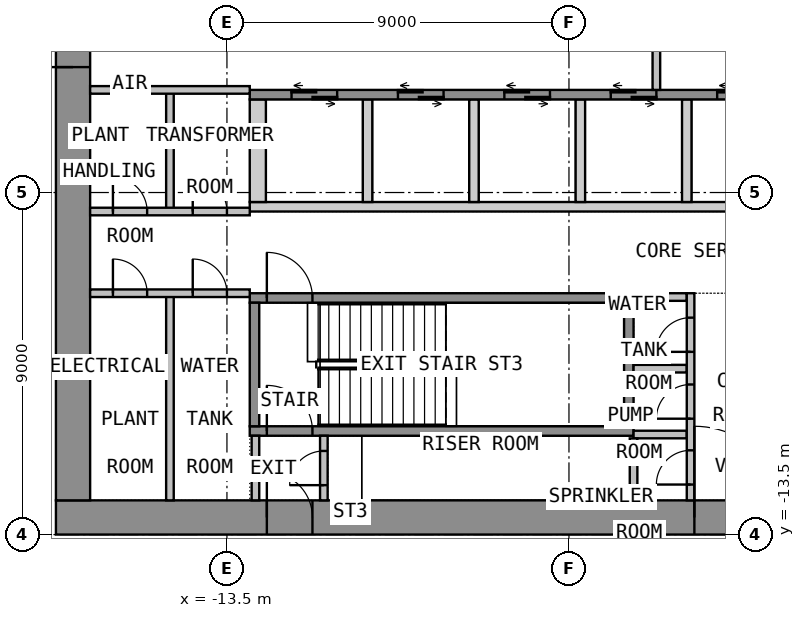
"""IFC4 building model, lengths in metres.
Left out: names, types, materials, properties, quantities, classifications, styles, units other than length and angle.
Written with IfcOpenShell. Run it as: python <this file> out.ifc"""

import sys

from ifc_helpers import new_model, si_unit, direction, frame, frame_2d, origin, place, context, subcontext, project, spatial, polyline, rectangle, outline, extrude, element, fill, save


model = new_model("IFC4")
c1 = context("Model", 3, precision=1e-05, world=origin(), true_north=direction((0.0, 1.0)))
c2 = subcontext(c1, "Body", "Model", "MODEL_VIEW")
j1 = project(units=[si_unit("LENGTHUNIT", "METRE"), si_unit("PLANEANGLEUNIT", "RADIAN")], contexts=[c1])
p1 = place(None, origin())
s1 = spatial("IfcSite", under=j1, at=p1, CompositionType="ELEMENT")
p2 = place(p1, origin())
s2 = spatial("IfcBuilding", under=s1, at=p2, CompositionType="ELEMENT")
p3 = place(p2, frame((0.0, 0.0, 76.8)))
s3 = spatial("IfcBuildingStorey", under=s2, at=p3, CompositionType="ELEMENT", Elevation=76.8)
p4 = place(p3, frame((-18.0, -13.05, 0.0), z_axis=(0.0, 0.0, 1.0), x_axis=(1.0, 0.0, 0.0)))
e1 = element("IfcWall", 1, at=p4, inside=s3, PredefinedType="SHEAR", context=c2, shape_type="SweptSolid", body=[
    extrude(rectangle(XDim=36.0, YDim=0.9, at=frame_2d((18.0, 0.0))), origin(), (0.0, 0.0, 1.0), 4.125),
])
p5 = place(p4, frame((16.8, 0.0, 0.0)))
e2 = element("IfcOpeningElement", 2, at=p5, cuts=e1, PredefinedType="OPENING", context=c2, shape_type="SweptSolid", body=[
    extrude(rectangle(XDim=2.4, YDim=2.1, at=frame_2d((1.2, 1.05))), frame((0.0, 0.46, 0.0), z_axis=(0.0, -1.0, 0.0), x_axis=(1.0, 0.0, 0.0)), (0.0, 0.0, 1.0), 0.92),
])
p6 = place(p4, frame((5.55, 0.0, 0.0)))
e3 = element("IfcOpeningElement", 3, at=p6, cuts=e1, PredefinedType="OPENING", context=c2, shape_type="SweptSolid", body=[
    extrude(rectangle(XDim=1.2, YDim=2.1, at=frame_2d((0.6, 1.05))), frame((0.0, 0.46, 0.0), z_axis=(0.0, -1.0, 0.0), x_axis=(1.0, 0.0, 0.0)), (0.0, 0.0, 1.0), 0.92),
])
p7 = place(p4, frame((29.25, 0.0, 0.0)))
e4 = element("IfcOpeningElement", 4, at=p7, cuts=e1, PredefinedType="OPENING", context=c2, shape_type="SweptSolid", body=[
    extrude(rectangle(XDim=1.2, YDim=2.1, at=frame_2d((0.6, 1.05))), frame((0.0, 0.46, 0.0), z_axis=(0.0, -1.0, 0.0), x_axis=(1.0, 0.0, 0.0)), (0.0, 0.0, 1.0), 0.92),
])
p8 = place(p3, frame((-17.55, -12.6, 0.0), z_axis=(0.0, 0.0, 1.0), x_axis=(0.0, 1.0, 0.0)))
e5 = element("IfcWall", 5, at=p8, inside=s3, PredefinedType="SHEAR", context=c2, shape_type="SweptSolid", body=[
    extrude(rectangle(XDim=25.2, YDim=0.9, at=frame_2d((12.6, 0.0))), origin(), (0.0, 0.0, 1.0), 4.125),
])
p9 = place(p8, frame((11.4, 0.0, 0.0)))
e6 = element("IfcOpeningElement", 6, at=p9, cuts=e5, PredefinedType="OPENING", context=c2, shape_type="SweptSolid", body=[
    extrude(rectangle(XDim=2.4, YDim=2.1, at=frame_2d((1.2, 1.05))), frame((0.0, 0.46, 0.0), z_axis=(0.0, -1.0, 0.0), x_axis=(1.0, 0.0, 0.0)), (0.0, 0.0, 1.0), 0.92),
])
p10 = place(p3, origin())
e7 = element("IfcWall", 7, at=p10, inside=s3, PredefinedType="SHEAR", context=c2, shape_type="SweptSolid", body=[
    extrude(outline(polyline([(-12.9, -5.0), (12.9, -5.0), (12.9, -4.75), (-12.9, -4.75), (-12.9, -5.0)])), origin(), (0.0, 0.0, 1.0), 4.125),
])
p11 = place(p3, origin())
e8 = element("IfcWall", 8, at=p11, inside=s3, PredefinedType="SHEAR", context=c2, shape_type="SweptSolid", body=[
    extrude(outline(polyline([(-12.9, -4.75), (-12.475, -4.75), (-12.475, -2.05), (-12.9, -2.05), (-12.9, -4.75)])), origin(), (0.0, 0.0, 1.0), 4.125),
])
p12 = place(p3, origin())
e9 = element("IfcWall", 9, at=p12, inside=s3, PredefinedType="SHEAR", context=c2, shape_type="SweptSolid", body=[
    extrude(outline(polyline([(-9.925, -4.75), (-9.675, -4.75), (-9.675, -2.05), (-9.925, -2.05), (-9.925, -4.75)])), origin(), (0.0, 0.0, 1.0), 4.125),
])
p13 = place(p3, origin())
e10 = element("IfcWall", 10, at=p13, inside=s3, PredefinedType="SHEAR", context=c2, shape_type="SweptSolid", body=[
    extrude(outline(polyline([(-7.125, -4.75), (-6.875, -4.75), (-6.875, -2.05), (-7.125, -2.05), (-7.125, -4.75)])), origin(), (0.0, 0.0, 1.0), 4.125),
])
p14 = place(p3, origin())
e11 = element("IfcWall", 11, at=p14, inside=s3, PredefinedType="SHEAR", context=c2, shape_type="SweptSolid", body=[
    extrude(outline(polyline([(-4.325, -4.75), (-4.075, -4.75), (-4.075, -2.05), (-4.325, -2.05), (-4.325, -4.75)])), origin(), (0.0, 0.0, 1.0), 4.125),
])
p15 = place(p3, origin())
e12 = element("IfcWall", 12, at=p15, inside=s3, PredefinedType="SHEAR", context=c2, shape_type="SweptSolid", body=[
    extrude(outline(polyline([(-1.525, -4.75), (-1.275, -4.75), (-1.275, -2.05), (-1.525, -2.05), (-1.525, -4.75)])), origin(), (0.0, 0.0, 1.0), 4.125),
])
p16 = place(p3, frame((-12.9, -1.925, 0.0), z_axis=(0.0, 0.0, 1.0), x_axis=(1.0, 0.0, 0.0)))
e13 = element("IfcWall", 13, at=p16, inside=s3, PredefinedType="SHEAR", context=c2, shape_type="SweptSolid", body=[
    extrude(rectangle(XDim=25.8, YDim=0.25, at=frame_2d((12.9, 0.0))), origin(), (0.0, 0.0, 1.0), 4.125),
])
p17 = place(p16, frame((1.1, 0.0, 0.0)))
e14 = element("IfcOpeningElement", 14, at=p17, cuts=e13, PredefinedType="OPENING", context=c2, shape_type="SweptSolid", body=[
    extrude(rectangle(XDim=1.2, YDim=2.1, at=frame_2d((0.6, 1.05))), frame((0.0, 0.135, 0.0), z_axis=(0.0, -1.0, 0.0), x_axis=(1.0, 0.0, 0.0)), (0.0, 0.0, 1.0), 0.27),
])
p18 = place(p16, frame((3.9, 0.0, 0.0)))
e15 = element("IfcOpeningElement", 15, at=p18, cuts=e13, PredefinedType="OPENING", context=c2, shape_type="SweptSolid", body=[
    extrude(rectangle(XDim=1.2, YDim=2.1, at=frame_2d((0.6, 1.05))), frame((0.0, 0.135, 0.0), z_axis=(0.0, -1.0, 0.0), x_axis=(1.0, 0.0, 0.0)), (0.0, 0.0, 1.0), 0.27),
])
p19 = place(p16, frame((6.7, 0.0, 0.0)))
e16 = element("IfcOpeningElement", 16, at=p19, cuts=e13, PredefinedType="OPENING", context=c2, shape_type="SweptSolid", body=[
    extrude(rectangle(XDim=1.2, YDim=2.1, at=frame_2d((0.6, 1.05))), frame((0.0, 0.135, 0.0), z_axis=(0.0, -1.0, 0.0), x_axis=(1.0, 0.0, 0.0)), (0.0, 0.0, 1.0), 0.27),
])
p20 = place(p16, frame((9.5, 0.0, 0.0)))
e17 = element("IfcOpeningElement", 17, at=p20, cuts=e13, PredefinedType="OPENING", context=c2, shape_type="SweptSolid", body=[
    extrude(rectangle(XDim=1.2, YDim=2.1, at=frame_2d((0.6, 1.05))), frame((0.0, 0.135, 0.0), z_axis=(0.0, -1.0, 0.0), x_axis=(1.0, 0.0, 0.0)), (0.0, 0.0, 1.0), 0.27),
])
p21 = place(p16, frame((12.3, 0.0, 0.0)))
e18 = element("IfcOpeningElement", 18, at=p21, cuts=e13, PredefinedType="OPENING", context=c2, shape_type="SweptSolid", body=[
    extrude(rectangle(XDim=1.2, YDim=2.1, at=frame_2d((0.6, 1.05))), frame((0.0, 0.135, 0.0), z_axis=(0.0, -1.0, 0.0), x_axis=(1.0, 0.0, 0.0)), (0.0, 0.0, 1.0), 0.27),
])
p22 = place(p16, frame((15.1, 0.0, 0.0)))
e19 = element("IfcOpeningElement", 19, at=p22, cuts=e13, PredefinedType="OPENING", context=c2, shape_type="SweptSolid", body=[
    extrude(rectangle(XDim=1.2, YDim=2.1, at=frame_2d((0.6, 1.05))), frame((0.0, 0.135, 0.0), z_axis=(0.0, -1.0, 0.0), x_axis=(1.0, 0.0, 0.0)), (0.0, 0.0, 1.0), 0.27),
])
p23 = place(p3, frame((-2.2, -1.8, 0.0), z_axis=(0.0, 0.0, 1.0), x_axis=(0.0, 1.0, 0.0)))
e20 = element("IfcWall", 20, at=p23, inside=s3, PredefinedType="PARTITIONING", context=c2, shape_type="SweptSolid", body=[
    extrude(rectangle(XDim=3.6, YDim=0.2, at=frame_2d((1.8, 0.0))), origin(), (0.0, 0.0, 1.0), 4.125),
])
p24 = place(p23, frame((1.2, 0.0, 0.0)))
e21 = element("IfcOpeningElement", 21, at=p24, cuts=e20, PredefinedType="OPENING", context=c2, shape_type="SweptSolid", body=[
    extrude(rectangle(XDim=1.2, YDim=2.1, at=frame_2d((0.6, 1.05))), frame((0.0, 0.11, 0.0), z_axis=(0.0, -1.0, 0.0), x_axis=(1.0, 0.0, 0.0)), (0.0, 0.0, 1.0), 0.22),
])
p25 = place(p3, frame((-12.9, -10.775, 0.0), z_axis=(0.0, 0.0, 1.0), x_axis=(1.0, 0.0, 0.0)))
e22 = element("IfcWall", 22, at=p25, inside=s3, PredefinedType="SHEAR", context=c2, shape_type="SweptSolid", body=[
    extrude(rectangle(XDim=10.1, YDim=0.25, at=frame_2d((5.05, 0.0))), origin(), (0.0, 0.0, 1.0), 4.125),
])
p26 = place(p25, frame((0.45, 0.0, 0.0)))
e23 = element("IfcOpeningElement", 23, at=p26, cuts=e22, PredefinedType="OPENING", context=c2, shape_type="SweptSolid", body=[
    extrude(rectangle(XDim=1.2, YDim=2.1, at=frame_2d((0.6, 1.05))), frame((0.0, 0.135, 0.0), z_axis=(0.0, -1.0, 0.0), x_axis=(1.0, 0.0, 0.0)), (0.0, 0.0, 1.0), 0.27),
])
p27 = place(p3, frame((-12.9, -7.275, 0.0), z_axis=(0.0, 0.0, 1.0), x_axis=(1.0, 0.0, 0.0)))
e24 = element("IfcWall", 24, at=p27, inside=s3, PredefinedType="SHEAR", context=c2, shape_type="SweptSolid", body=[
    extrude(rectangle(XDim=10.1, YDim=0.25, at=frame_2d((5.05, 0.0))), origin(), (0.0, 0.0, 1.0), 4.125),
])
p28 = place(p27, frame((0.45, 0.0, 0.0)))
e25 = element("IfcOpeningElement", 25, at=p28, cuts=e24, PredefinedType="OPENING", context=c2, shape_type="SweptSolid", body=[
    extrude(rectangle(XDim=1.2, YDim=2.1, at=frame_2d((0.6, 1.05))), frame((0.0, 0.135, 0.0), z_axis=(0.0, -1.0, 0.0), x_axis=(1.0, 0.0, 0.0)), (0.0, 0.0, 1.0), 0.27),
])
for number, where, z_axis, x_axis in (
    (26, (-12.775, -10.65, 0.0), (0.0, 0.0, 1.0), (0.0, 1.0, 0.0)),
    (27, (-2.925, -10.65, 0.0), (0.0, 0.0, 1.0), (0.0, 1.0, 0.0)),
):
    element("IfcWall", number, at=place(p3, frame(where, z_axis=z_axis, x_axis=x_axis)), inside=s3, PredefinedType="SHEAR", context=c2, shape_type="SweptSolid", body=[
        extrude(rectangle(XDim=3.25, YDim=0.25, at=frame_2d((1.625, 0.0))), origin(), (0.0, 0.0, 1.0), 4.125),
    ])
for number, where, z_axis, x_axis in (
    (28, (-2.8, -7.25, 0.0), (0.0, 0.0, 1.0), (1.0, 0.0, 0.0)),
    (29, (-2.8, -9.135, 0.0), (0.0, 0.0, 1.0), (1.0, 0.0, 0.0)),
    (30, (-2.8, -10.867, 0.0), (0.0, 0.0, 1.0), (1.0, 0.0, 0.0)),
):
    element("IfcWall", number, at=place(p3, frame(where, z_axis=z_axis, x_axis=x_axis)), inside=s3, PredefinedType="PARTITIONING", context=c2, shape_type="SweptSolid", body=[
        extrude(rectangle(XDim=1.4, YDim=0.2, at=frame_2d((0.7, 0.0))), origin(), (0.0, 0.0, 1.0), 4.125),
    ])
p29 = place(p3, frame((-1.3, -12.6, 0.0), z_axis=(0.0, 0.0, 1.0), x_axis=(0.0, 1.0, 0.0)))
e31 = element("IfcWall", 31, at=p29, inside=s3, PredefinedType="PARTITIONING", context=c2, shape_type="SweptSolid", body=[
    extrude(rectangle(XDim=5.45, YDim=0.2, at=frame_2d((2.725, 0.0))), origin(), (0.0, 0.0, 1.0), 4.125),
])
p30 = place(p29, frame((0.416, 0.0, 0.0)))
e32 = element("IfcOpeningElement", 32, at=p30, cuts=e31, PredefinedType="OPENING", context=c2, shape_type="SweptSolid", body=[
    extrude(rectangle(XDim=0.9, YDim=2.1, at=frame_2d((0.45, 1.05))), frame((0.0, 0.11, 0.0), z_axis=(0.0, -1.0, 0.0), x_axis=(1.0, 0.0, 0.0)), (0.0, 0.0, 1.0), 0.22),
])
p31 = place(p29, frame((2.149, 0.0, 0.0)))
e33 = element("IfcOpeningElement", 33, at=p31, cuts=e31, PredefinedType="OPENING", context=c2, shape_type="SweptSolid", body=[
    extrude(rectangle(XDim=0.9, YDim=2.1, at=frame_2d((0.45, 1.05))), frame((0.0, 0.11, 0.0), z_axis=(0.0, -1.0, 0.0), x_axis=(1.0, 0.0, 0.0)), (0.0, 0.0, 1.0), 0.22),
])
p32 = place(p29, frame((3.907, 0.0, 0.0)))
e34 = element("IfcOpeningElement", 34, at=p32, cuts=e31, PredefinedType="OPENING", context=c2, shape_type="SweptSolid", body=[
    extrude(rectangle(XDim=0.9, YDim=2.1, at=frame_2d((0.45, 1.05))), frame((0.0, 0.11, 0.0), z_axis=(0.0, -1.0, 0.0), x_axis=(1.0, 0.0, 0.0)), (0.0, 0.0, 1.0), 0.22),
])
p33 = place(p3, frame((-12.75, -12.6, 0.0), z_axis=(0.0, 0.0, 1.0), x_axis=(0.0, 1.0, 0.0)))
e35 = element("IfcWall", 35, at=p33, inside=s3, PredefinedType="PARTITIONING", context=c2, shape_type="SweptSolid", body=[
    extrude(rectangle(XDim=1.7, YDim=0.2, at=frame_2d((0.85, 0.0))), origin(), (0.0, 0.0, 1.0), 4.125),
])
p34 = place(p3, frame((-10.95, -12.6, 0.0), z_axis=(0.0, 0.0, 1.0), x_axis=(0.0, 1.0, 0.0)))
e36 = element("IfcWall", 36, at=p34, inside=s3, PredefinedType="PARTITIONING", context=c2, shape_type="SweptSolid", body=[
    extrude(rectangle(XDim=1.7, YDim=0.2, at=frame_2d((0.85, 0.0))), origin(), (0.0, 0.0, 1.0), 4.125),
])
p35 = place(p34, frame((0.4, 0.0, 0.0)))
e37 = element("IfcOpeningElement", 37, at=p35, cuts=e36, PredefinedType="OPENING", context=c2, shape_type="SweptSolid", body=[
    extrude(rectangle(XDim=0.9, YDim=2.1, at=frame_2d((0.45, 1.05))), frame((0.0, 0.11, 0.0), z_axis=(0.0, -1.0, 0.0), x_axis=(1.0, 0.0, 0.0)), (0.0, 0.0, 1.0), 0.22),
])
p36 = place(p3, frame((-15.0, -12.6, 0.0), z_axis=(0.0, 0.0, 1.0), x_axis=(0.0, 1.0, 0.0)))
e38 = element("IfcWall", 38, at=p36, inside=s3, PredefinedType="PARTITIONING", context=c2, shape_type="SweptSolid", body=[
    extrude(rectangle(XDim=5.45, YDim=0.2, at=frame_2d((2.725, 0.0))), origin(), (0.0, 0.0, 1.0), 4.125),
])
p37 = place(p3, frame((-17.1, -7.15, 0.0), z_axis=(0.0, 0.0, 1.0), x_axis=(1.0, 0.0, 0.0)))
e39 = element("IfcWall", 39, at=p37, inside=s3, PredefinedType="PARTITIONING", context=c2, shape_type="SweptSolid", body=[
    extrude(rectangle(XDim=4.2, YDim=0.2, at=frame_2d((2.1, 0.0))), origin(), (0.0, 0.0, 1.0), 4.125),
])
p38 = place(p37, frame((0.6, 0.0, 0.0)))
e40 = element("IfcOpeningElement", 40, at=p38, cuts=e39, PredefinedType="OPENING", context=c2, shape_type="SweptSolid", body=[
    extrude(rectangle(XDim=0.9, YDim=2.1, at=frame_2d((0.45, 1.05))), frame((0.0, 0.11, 0.0), z_axis=(0.0, -1.0, 0.0), x_axis=(1.0, 0.0, 0.0)), (0.0, 0.0, 1.0), 0.22),
])
p39 = place(p37, frame((2.7, 0.0, 0.0)))
e41 = element("IfcOpeningElement", 41, at=p39, cuts=e39, PredefinedType="OPENING", context=c2, shape_type="SweptSolid", body=[
    extrude(rectangle(XDim=0.9, YDim=2.1, at=frame_2d((0.45, 1.05))), frame((0.0, 0.11, 0.0), z_axis=(0.0, -1.0, 0.0), x_axis=(1.0, 0.0, 0.0)), (0.0, 0.0, 1.0), 0.22),
])
p40 = place(p3, frame((-15.0, -5.0, 0.0), z_axis=(0.0, 0.0, 1.0), x_axis=(0.0, 1.0, 0.0)))
e42 = element("IfcWall", 42, at=p40, inside=s3, PredefinedType="PARTITIONING", context=c2, shape_type="SweptSolid", body=[
    extrude(rectangle(XDim=3.2, YDim=0.2, at=frame_2d((1.6, 0.0))), origin(), (0.0, 0.0, 1.0), 4.125),
])
p41 = place(p3, frame((-17.1, -5.0, 0.0), z_axis=(0.0, 0.0, 1.0), x_axis=(1.0, 0.0, 0.0)))
e43 = element("IfcWall", 43, at=p41, inside=s3, PredefinedType="PARTITIONING", context=c2, shape_type="SweptSolid", body=[
    extrude(rectangle(XDim=4.2, YDim=0.2, at=frame_2d((2.1, 0.0))), origin(), (0.0, 0.0, 1.0), 4.125),
])
p42 = place(p41, frame((0.6, 0.0, 0.0)))
e44 = element("IfcOpeningElement", 44, at=p42, cuts=e43, PredefinedType="OPENING", context=c2, shape_type="SweptSolid", body=[
    extrude(rectangle(XDim=0.9, YDim=2.1, at=frame_2d((0.45, 1.05))), frame((0.0, 0.11, 0.0), z_axis=(0.0, -1.0, 0.0), x_axis=(1.0, 0.0, 0.0)), (0.0, 0.0, 1.0), 0.22),
])
p43 = place(p41, frame((2.7, 0.0, 0.0)))
e45 = element("IfcOpeningElement", 45, at=p43, cuts=e43, PredefinedType="OPENING", context=c2, shape_type="SweptSolid", body=[
    extrude(rectangle(XDim=0.9, YDim=2.1, at=frame_2d((0.45, 1.05))), frame((0.0, 0.11, 0.0), z_axis=(0.0, -1.0, 0.0), x_axis=(1.0, 0.0, 0.0)), (0.0, 0.0, 1.0), 0.22),
])
p44 = place(p3, frame((-17.1, -1.8, 0.0), z_axis=(0.0, 0.0, 1.0), x_axis=(1.0, 0.0, 0.0)))
e46 = element("IfcWall", 46, at=p44, inside=s3, PredefinedType="PARTITIONING", context=c2, shape_type="SweptSolid", body=[
    extrude(rectangle(XDim=4.2, YDim=0.2, at=frame_2d((2.1, 0.0))), origin(), (0.0, 0.0, 1.0), 4.125),
])
p45 = place(p3, frame((-2.8, -12.599, 0.0), z_axis=(0.0, 0.0, 1.0), x_axis=(0.0, 1.0, 0.0)))
e47 = element("IfcWall", 47, at=p45, inside=s3, PredefinedType="PARTITIONING", context=c2, shape_type="SweptSolid", body=[
    extrude(rectangle(XDim=1.631, YDim=0.2, at=frame_2d((0.815, 0.0))), origin(), (0.0, 0.0, 1.0), 4.125),
])
p46 = place(p9, origin())
e48 = element("IfcDoor", 48, at=p46, inside=s3, OperationType="DOUBLE_DOOR_DOUBLE_SWING", PredefinedType="DOOR", context=c2, shape_type="SweptSolid", body=[
    extrude(rectangle(XDim=2.4, YDim=2.1, at=frame_2d((1.2, 1.05))), frame((0.0, 0.025, 0.0), z_axis=(0.0, -1.0, 0.0), x_axis=(1.0, 0.0, 0.0)), (0.0, 0.0, 1.0), 0.05),
])
fill(e6, e48)
p47 = place(p5, origin())
e49 = element("IfcDoor", 49, at=p47, inside=s3, OperationType="DOUBLE_DOOR_DOUBLE_SWING", PredefinedType="DOOR", context=c2, shape_type="SweptSolid", body=[
    extrude(rectangle(XDim=2.4, YDim=2.1, at=frame_2d((1.2, 1.05))), frame((0.0, 0.025, 0.0), z_axis=(0.0, -1.0, 0.0), x_axis=(1.0, 0.0, 0.0)), (0.0, 0.0, 1.0), 0.05),
])
fill(e2, e49)
p48 = place(p6, origin())
e50 = element("IfcDoor", 50, at=p48, inside=s3, OperationType="SINGLE_SWING_RIGHT", PredefinedType="DOOR", context=c2, shape_type="SweptSolid", body=[
    extrude(rectangle(XDim=1.2, YDim=2.1, at=frame_2d((0.6, 1.05))), frame((0.0, 0.025, 0.0), z_axis=(0.0, -1.0, 0.0), x_axis=(1.0, 0.0, 0.0)), (0.0, 0.0, 1.0), 0.05),
])
fill(e3, e50)
p49 = place(p17, origin())
e51 = element("IfcDoor", 51, at=p49, inside=s3, OperationType="DOUBLE_DOOR_SLIDING", PredefinedType="DOOR", context=c2, shape_type="SweptSolid", body=[
    extrude(rectangle(XDim=1.2, YDim=2.1, at=frame_2d((0.6, 1.05))), frame((0.0, 0.025, 0.0), z_axis=(0.0, -1.0, 0.0), x_axis=(1.0, 0.0, 0.0)), (0.0, 0.0, 1.0), 0.05),
])
fill(e14, e51)
p50 = place(p18, origin())
e52 = element("IfcDoor", 52, at=p50, inside=s3, OperationType="DOUBLE_DOOR_SLIDING", PredefinedType="DOOR", context=c2, shape_type="SweptSolid", body=[
    extrude(rectangle(XDim=1.2, YDim=2.1, at=frame_2d((0.6, 1.05))), frame((0.0, 0.025, 0.0), z_axis=(0.0, -1.0, 0.0), x_axis=(1.0, 0.0, 0.0)), (0.0, 0.0, 1.0), 0.05),
])
fill(e15, e52)
p51 = place(p19, origin())
e53 = element("IfcDoor", 53, at=p51, inside=s3, OperationType="DOUBLE_DOOR_SLIDING", PredefinedType="DOOR", context=c2, shape_type="SweptSolid", body=[
    extrude(rectangle(XDim=1.2, YDim=2.1, at=frame_2d((0.6, 1.05))), frame((0.0, 0.025, 0.0), z_axis=(0.0, -1.0, 0.0), x_axis=(1.0, 0.0, 0.0)), (0.0, 0.0, 1.0), 0.05),
])
fill(e16, e53)
p52 = place(p20, origin())
e54 = element("IfcDoor", 54, at=p52, inside=s3, OperationType="DOUBLE_DOOR_SLIDING", PredefinedType="DOOR", context=c2, shape_type="SweptSolid", body=[
    extrude(rectangle(XDim=1.2, YDim=2.1, at=frame_2d((0.6, 1.05))), frame((0.0, 0.025, 0.0), z_axis=(0.0, -1.0, 0.0), x_axis=(1.0, 0.0, 0.0)), (0.0, 0.0, 1.0), 0.05),
])
fill(e17, e54)
p53 = place(p21, origin())
e55 = element("IfcDoor", 55, at=p53, inside=s3, OperationType="DOUBLE_DOOR_SLIDING", PredefinedType="DOOR", context=c2, shape_type="SweptSolid", body=[
    extrude(rectangle(XDim=1.2, YDim=2.1, at=frame_2d((0.6, 1.05))), frame((0.0, 0.025, 0.0), z_axis=(0.0, -1.0, 0.0), x_axis=(1.0, 0.0, 0.0)), (0.0, 0.0, 1.0), 0.05),
])
fill(e18, e55)
p54 = place(p28, origin())
e56 = element("IfcDoor", 56, at=p54, inside=s3, OperationType="SINGLE_SWING_LEFT", PredefinedType="DOOR", context=c2, shape_type="SweptSolid", body=[
    extrude(rectangle(XDim=1.2, YDim=2.1, at=frame_2d((0.6, 1.05))), frame((0.0, 0.025, 0.0), z_axis=(0.0, -1.0, 0.0), x_axis=(1.0, 0.0, 0.0)), (0.0, 0.0, 1.0), 0.05),
])
fill(e25, e56)
p55 = place(p30, origin())
e57 = element("IfcDoor", 57, at=p55, inside=s3, OperationType="SINGLE_SWING_LEFT", PredefinedType="DOOR", context=c2, shape_type="SweptSolid", body=[
    extrude(rectangle(XDim=0.9, YDim=2.1, at=frame_2d((0.45, 1.05))), frame((0.0, 0.025, 0.0), z_axis=(0.0, -1.0, 0.0), x_axis=(1.0, 0.0, 0.0)), (0.0, 0.0, 1.0), 0.05),
])
fill(e32, e57)
p56 = place(p31, origin())
e58 = element("IfcDoor", 58, at=p56, inside=s3, OperationType="SINGLE_SWING_LEFT", PredefinedType="DOOR", context=c2, shape_type="SweptSolid", body=[
    extrude(rectangle(XDim=0.9, YDim=2.1, at=frame_2d((0.45, 1.05))), frame((0.0, 0.025, 0.0), z_axis=(0.0, -1.0, 0.0), x_axis=(1.0, 0.0, 0.0)), (0.0, 0.0, 1.0), 0.05),
])
fill(e33, e58)
p57 = place(p32, origin())
e59 = element("IfcDoor", 59, at=p57, inside=s3, OperationType="SINGLE_SWING_LEFT", PredefinedType="DOOR", context=c2, shape_type="SweptSolid", body=[
    extrude(rectangle(XDim=0.9, YDim=2.1, at=frame_2d((0.45, 1.05))), frame((0.0, 0.025, 0.0), z_axis=(0.0, -1.0, 0.0), x_axis=(1.0, 0.0, 0.0)), (0.0, 0.0, 1.0), 0.05),
])
fill(e34, e59)
p58 = place(p26, origin())
e60 = element("IfcDoor", 60, at=p58, inside=s3, OperationType="SINGLE_SWING_RIGHT", PredefinedType="DOOR", context=c2, shape_type="SweptSolid", body=[
    extrude(rectangle(XDim=1.2, YDim=2.1, at=frame_2d((0.6, 1.05))), frame((0.0, 0.025, 0.0), z_axis=(0.0, -1.0, 0.0), x_axis=(1.0, 0.0, 0.0)), (0.0, 0.0, 1.0), 0.05),
])
fill(e23, e60)
p59 = place(p35, origin())
e61 = element("IfcDoor", 61, at=p59, inside=s3, OperationType="SINGLE_SWING_LEFT", PredefinedType="DOOR", context=c2, shape_type="SweptSolid", body=[
    extrude(rectangle(XDim=0.9, YDim=2.1, at=frame_2d((0.45, 1.05))), frame((0.0, 0.025, 0.0), z_axis=(0.0, -1.0, 0.0), x_axis=(1.0, 0.0, 0.0)), (0.0, 0.0, 1.0), 0.05),
])
fill(e37, e61)
p60 = place(p38, origin())
e62 = element("IfcDoor", 62, at=p60, inside=s3, OperationType="SINGLE_SWING_LEFT", PredefinedType="DOOR", context=c2, shape_type="SweptSolid", body=[
    extrude(rectangle(XDim=0.9, YDim=2.1, at=frame_2d((0.45, 1.05))), frame((0.0, 0.025, 0.0), z_axis=(0.0, -1.0, 0.0), x_axis=(1.0, 0.0, 0.0)), (0.0, 0.0, 1.0), 0.05),
])
fill(e40, e62)
p61 = place(p39, origin())
e63 = element("IfcDoor", 63, at=p61, inside=s3, OperationType="SINGLE_SWING_LEFT", PredefinedType="DOOR", context=c2, shape_type="SweptSolid", body=[
    extrude(rectangle(XDim=0.9, YDim=2.1, at=frame_2d((0.45, 1.05))), frame((0.0, 0.025, 0.0), z_axis=(0.0, -1.0, 0.0), x_axis=(1.0, 0.0, 0.0)), (0.0, 0.0, 1.0), 0.05),
])
fill(e41, e63)
p62 = place(p42, origin())
e64 = element("IfcDoor", 64, at=p62, inside=s3, OperationType="SINGLE_SWING_LEFT", PredefinedType="DOOR", context=c2, shape_type="SweptSolid", body=[
    extrude(rectangle(XDim=0.9, YDim=2.1, at=frame_2d((0.45, 1.05))), frame((0.0, 0.025, 0.0), z_axis=(0.0, -1.0, 0.0), x_axis=(1.0, 0.0, 0.0)), (0.0, 0.0, 1.0), 0.05),
])
fill(e44, e64)
p63 = place(p43, origin())
e65 = element("IfcDoor", 65, at=p63, inside=s3, OperationType="SINGLE_SWING_LEFT", PredefinedType="DOOR", context=c2, shape_type="SweptSolid", body=[
    extrude(rectangle(XDim=0.9, YDim=2.1, at=frame_2d((0.45, 1.05))), frame((0.0, 0.025, 0.0), z_axis=(0.0, -1.0, 0.0), x_axis=(1.0, 0.0, 0.0)), (0.0, 0.0, 1.0), 0.05),
])
fill(e45, e65)
save(model, sys.argv[1])
